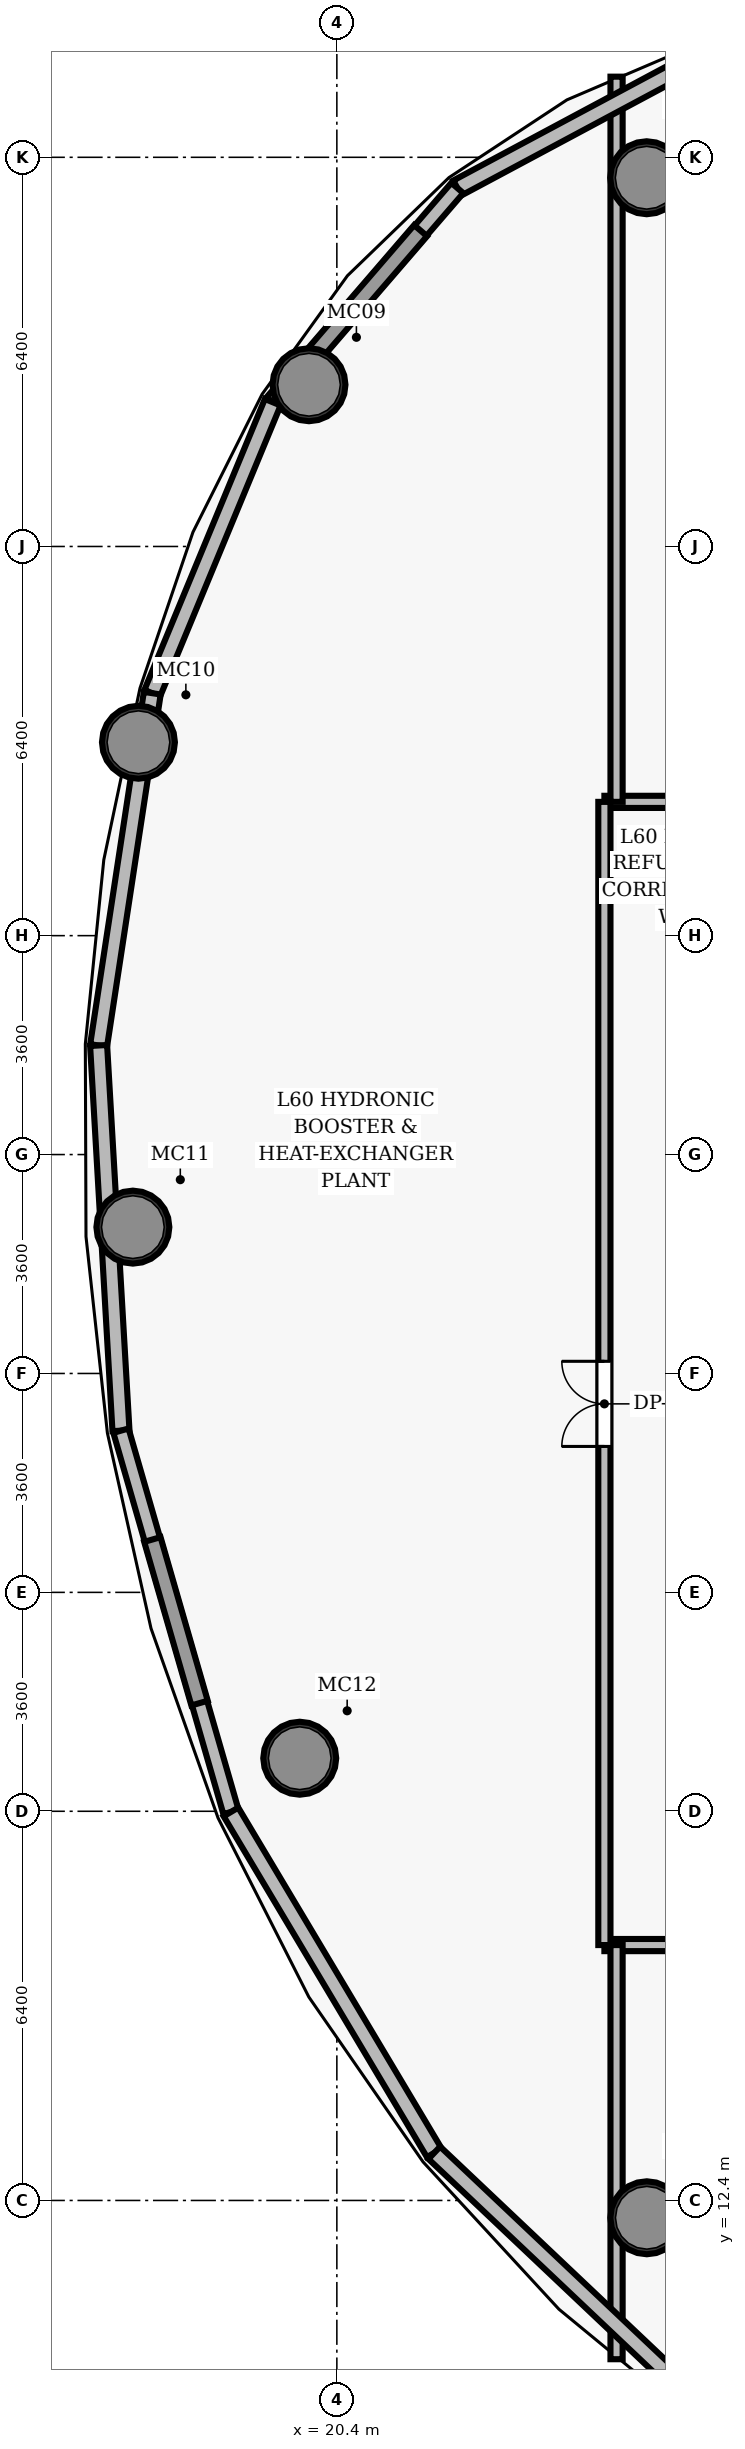
"""IFC4 building model, lengths in metres.
Left out: names, types, materials, properties, quantities, classifications, styles, units other than length and angle.
Written with IfcOpenShell. Run it as: python <this file> out.ifc"""

import sys

from ifc_helpers import new_model, si_unit, direction, frame, frame_2d, origin, origin_2d, place, context, subcontext, project, spatial, rectangle, hollow_circle, extrude, element, fill, save


model = new_model("IFC4")
c1 = context("Model", 3, precision=1e-05, world=origin(), true_north=direction((0.0, 1.0)))
c2 = subcontext(c1, "Body", "Model", "MODEL_VIEW")
j1 = project(units=[si_unit("LENGTHUNIT", "METRE"), si_unit("PLANEANGLEUNIT", "RADIAN")], contexts=[c1])
p1 = place(None, origin())
s1 = spatial("IfcSite", under=j1, at=p1, CompositionType="ELEMENT")
p2 = place(p1, origin())
s2 = spatial("IfcBuilding", under=s1, at=p2, CompositionType="ELEMENT")
p3 = place(p2, frame((0.0, 0.0, 236.65)))
s3 = spatial("IfcBuildingStorey", under=s2, at=p3, CompositionType="ELEMENT", Elevation=236.65)
for number, where, z_axis, x_axis in (
    (1, (25.496, 45.664, 0.0), (0.0, 0.0, 1.0), (1.0, 0.0, 0.0)),
    (2, (19.942, 42.26, 0.0), (0.0, 0.0, 1.0), (1.0, 0.0, 0.0)),
    (3, (17.137, 36.381, 0.0), (0.0, 0.0, 1.0), (1.0, 0.0, 0.0)),
    (4, (17.045, 28.406, 0.0), (0.0, 0.0, 1.0), (1.0, 0.0, 0.0)),
    (5, (19.79, 19.673, 0.0), (0.0, 0.0, 1.0), (1.0, 0.0, 0.0)),
    (6, (25.498, 12.115, 0.0), (0.0, 0.0, 1.0), (1.0, 0.0, 0.0)),
):
    element("IfcColumn", number, at=place(p3, frame(where, z_axis=z_axis, x_axis=x_axis)), inside=s3, PredefinedType="COLUMN", context=c2, shape_type="SweptSolid", body=[
        extrude(hollow_circle(Radius=0.6, WallThickness=0.05, at=origin_2d()), origin(), (0.0, 0.0, 1.0), 5.4),
    ])
p4 = place(p3, frame((24.8, 35.4, 0.0), z_axis=(0.0, 0.0, 1.0), x_axis=(1.0, 0.0, 0.0)))
e7 = element("IfcWall", 7, at=p4, inside=s3, PredefinedType="PARTITIONING", context=c2, shape_type="SweptSolid", body=[
    extrude(rectangle(XDim=26.4, YDim=0.2, at=frame_2d((13.2, 0.0))), origin(), (0.0, 0.0, 1.0), 4.04),
])
p5 = place(p4, frame((11.5, 0.0, 0.0)))
e8 = element("IfcOpeningElement", 8, at=p5, cuts=e7, PredefinedType="OPENING", context=c2, shape_type="SweptSolid", body=[
    extrude(rectangle(XDim=1.4, YDim=2.25, at=frame_2d((0.7, 1.125))), frame((0.0, 0.11, 0.0), z_axis=(0.0, -1.0, 0.0), x_axis=(1.0, 0.0, 0.0)), (0.0, 0.0, 1.0), 0.22),
])
p6 = place(p3, frame((24.8, 16.6, 0.0), z_axis=(0.0, 0.0, 1.0), x_axis=(1.0, 0.0, 0.0)))
e9 = element("IfcWall", 9, at=p6, inside=s3, PredefinedType="PARTITIONING", context=c2, shape_type="SweptSolid", body=[
    extrude(rectangle(XDim=26.4, YDim=0.2, at=frame_2d((13.2, 0.0))), origin(), (0.0, 0.0, 1.0), 4.04),
])
p7 = place(p6, frame((11.5, 0.0, 0.0)))
e10 = element("IfcOpeningElement", 10, at=p7, cuts=e9, PredefinedType="OPENING", context=c2, shape_type="SweptSolid", body=[
    extrude(rectangle(XDim=1.8, YDim=2.35, at=frame_2d((0.9, 1.175))), frame((0.0, 0.11, 0.0), z_axis=(0.0, -1.0, 0.0), x_axis=(1.0, 0.0, 0.0)), (0.0, 0.0, 1.0), 0.22),
])
p8 = place(p3, frame((24.8, 16.6, 0.0), z_axis=(0.0, 0.0, 1.0), x_axis=(0.0, 1.0, 0.0)))
e11 = element("IfcWall", 11, at=p8, inside=s3, PredefinedType="PARTITIONING", context=c2, shape_type="SweptSolid", body=[
    extrude(rectangle(XDim=18.8, YDim=0.2, at=frame_2d((9.4, 0.0))), origin(), (0.0, 0.0, 1.0), 4.04),
])
p9 = place(p8, frame((8.2, 0.0, 0.0)))
e12 = element("IfcOpeningElement", 12, at=p9, cuts=e11, PredefinedType="OPENING", context=c2, shape_type="SweptSolid", body=[
    extrude(rectangle(XDim=1.4, YDim=2.25, at=frame_2d((0.7, 1.125))), frame((0.0, 0.11, 0.0), z_axis=(0.0, -1.0, 0.0), x_axis=(1.0, 0.0, 0.0)), (0.0, 0.0, 1.0), 0.22),
])
p10 = place(p3, frame((25.0, 9.789, 0.0), z_axis=(0.0, 0.0, 1.0), x_axis=(0.0, 1.0, 0.0)))
e13 = element("IfcWall", 13, at=p10, inside=s3, PredefinedType="PARTITIONING", context=c2, shape_type="SweptSolid", body=[
    extrude(rectangle(XDim=6.811, YDim=0.2, at=frame_2d((3.406, 0.0))), origin(), (0.0, 0.0, 1.0), 4.04),
])
p11 = place(p3, frame((25.0, 35.4, 0.0), z_axis=(0.0, 0.0, 1.0), x_axis=(0.0, 1.0, 0.0)))
e14 = element("IfcWall", 14, at=p11, inside=s3, PredefinedType="PARTITIONING", context=c2, shape_type="SweptSolid", body=[
    extrude(rectangle(XDim=11.926, YDim=0.2, at=frame_2d((5.963, 0.0))), origin(), (0.0, 0.0, 1.0), 4.04),
])
p12 = place(p3, frame((22.381, 45.495, 0.0), z_axis=(0.0, 0.0, 1.0), x_axis=(0.88168357973, 0.471841144067, 0.0)))
e15 = element("IfcWall", 15, at=p12, inside=s3, PredefinedType="SOLIDWALL", context=c2, shape_type="SweptSolid", body=[
    extrude(rectangle(XDim=4.651, YDim=0.28, at=frame_2d((2.325, 0.0))), origin(), (0.0, 0.0, 1.0), 4.98),
])
p13 = place(p3, frame((19.345, 41.972, 0.0), z_axis=(0.0, 0.0, 1.0), x_axis=(0.65279941613, 0.757530806173, 0.0)))
e16 = element("IfcWall", 16, at=p13, inside=s3, PredefinedType="SOLIDWALL", context=c2, shape_type="SweptSolid", body=[
    extrude(rectangle(XDim=4.651, YDim=0.26, at=frame_2d((2.325, 0.0))), origin(), (0.0, 0.0, 1.0), 4.98),
])
p14 = place(p3, frame((17.364, 37.187, 0.0), z_axis=(0.0, 0.0, 1.0), x_axis=(0.382579387881, 0.923922622284, 0.0)))
e17 = element("IfcWall", 17, at=p14, inside=s3, PredefinedType="SOLIDWALL", context=c2, shape_type="SweptSolid", body=[
    extrude(rectangle(XDim=5.179, YDim=0.28, at=frame_2d((2.59, 0.0))), origin(), (0.0, 0.0, 1.0), 4.98),
])
p15 = place(p3, frame((16.482, 31.394, 0.0), z_axis=(0.0, 0.0, 1.0), x_axis=(0.150526090897, 0.988606036781, 0.0)))
e18 = element("IfcWall", 18, at=p15, inside=s3, PredefinedType="SOLIDWALL", context=c2, shape_type="SweptSolid", body=[
    extrude(rectangle(XDim=5.86, YDim=0.28, at=frame_2d((2.93, 0.0))), origin(), (0.0, 0.0, 1.0), 4.98),
])
p16 = place(p3, frame((16.85, 25.059, 0.0), z_axis=(0.0, 0.0, 1.0), x_axis=(-0.057946099127, 0.998319713116, 0.0)))
e19 = element("IfcWall", 19, at=p16, inside=s3, PredefinedType="SOLIDWALL", context=c2, shape_type="SweptSolid", body=[
    extrude(rectangle(XDim=6.345, YDim=0.28, at=frame_2d((3.173, 0.0))), origin(), (0.0, 0.0, 1.0), 4.98),
])
p17 = place(p3, frame((18.658, 18.789, 0.0), z_axis=(0.0, 0.0, 1.0), x_axis=(-0.277165964475, 0.960822058519, 0.0)))
e20 = element("IfcWall", 20, at=p17, inside=s3, PredefinedType="SOLIDWALL", context=c2, shape_type="SweptSolid", body=[
    extrude(rectangle(XDim=6.526, YDim=0.26, at=frame_2d((3.263, 0.0))), origin(), (0.0, 0.0, 1.0), 4.98),
])
p18 = place(p3, frame((22.002, 13.184, 0.0), z_axis=(0.0, 0.0, 1.0), x_axis=(-0.512337833972, 0.858783991397, 0.0)))
e21 = element("IfcWall", 21, at=p18, inside=s3, PredefinedType="SOLIDWALL", context=c2, shape_type="SweptSolid", body=[
    extrude(rectangle(XDim=6.527, YDim=0.28, at=frame_2d((3.263, 0.0))), origin(), (0.0, 0.0, 1.0), 4.98),
])
p19 = place(p3, frame((26.743, 8.698, 0.0), z_axis=(0.0, 0.0, 1.0), x_axis=(-0.726362423444, 0.687311886852, 0.0)))
e22 = element("IfcWall", 22, at=p19, inside=s3, PredefinedType="SOLIDWALL", context=c2, shape_type="SweptSolid", body=[
    extrude(rectangle(XDim=6.527, YDim=0.28, at=frame_2d((3.264, 0.0))), origin(), (0.0, 0.0, 1.0), 4.98),
])
p20 = place(p9, origin())
e23 = element("IfcDoor", 23, at=p20, inside=s3, OperationType="DOUBLE_DOOR_SINGLE_SWING", PredefinedType="DOOR", context=c2, shape_type="SweptSolid", body=[
    extrude(rectangle(XDim=1.4, YDim=2.25, at=frame_2d((0.7, 1.125))), frame((0.0, 0.025, 0.0), z_axis=(0.0, -1.0, 0.0), x_axis=(1.0, 0.0, 0.0)), (0.0, 0.0, 1.0), 0.05),
])
fill(e12, e23)
save(model, sys.argv[1])
